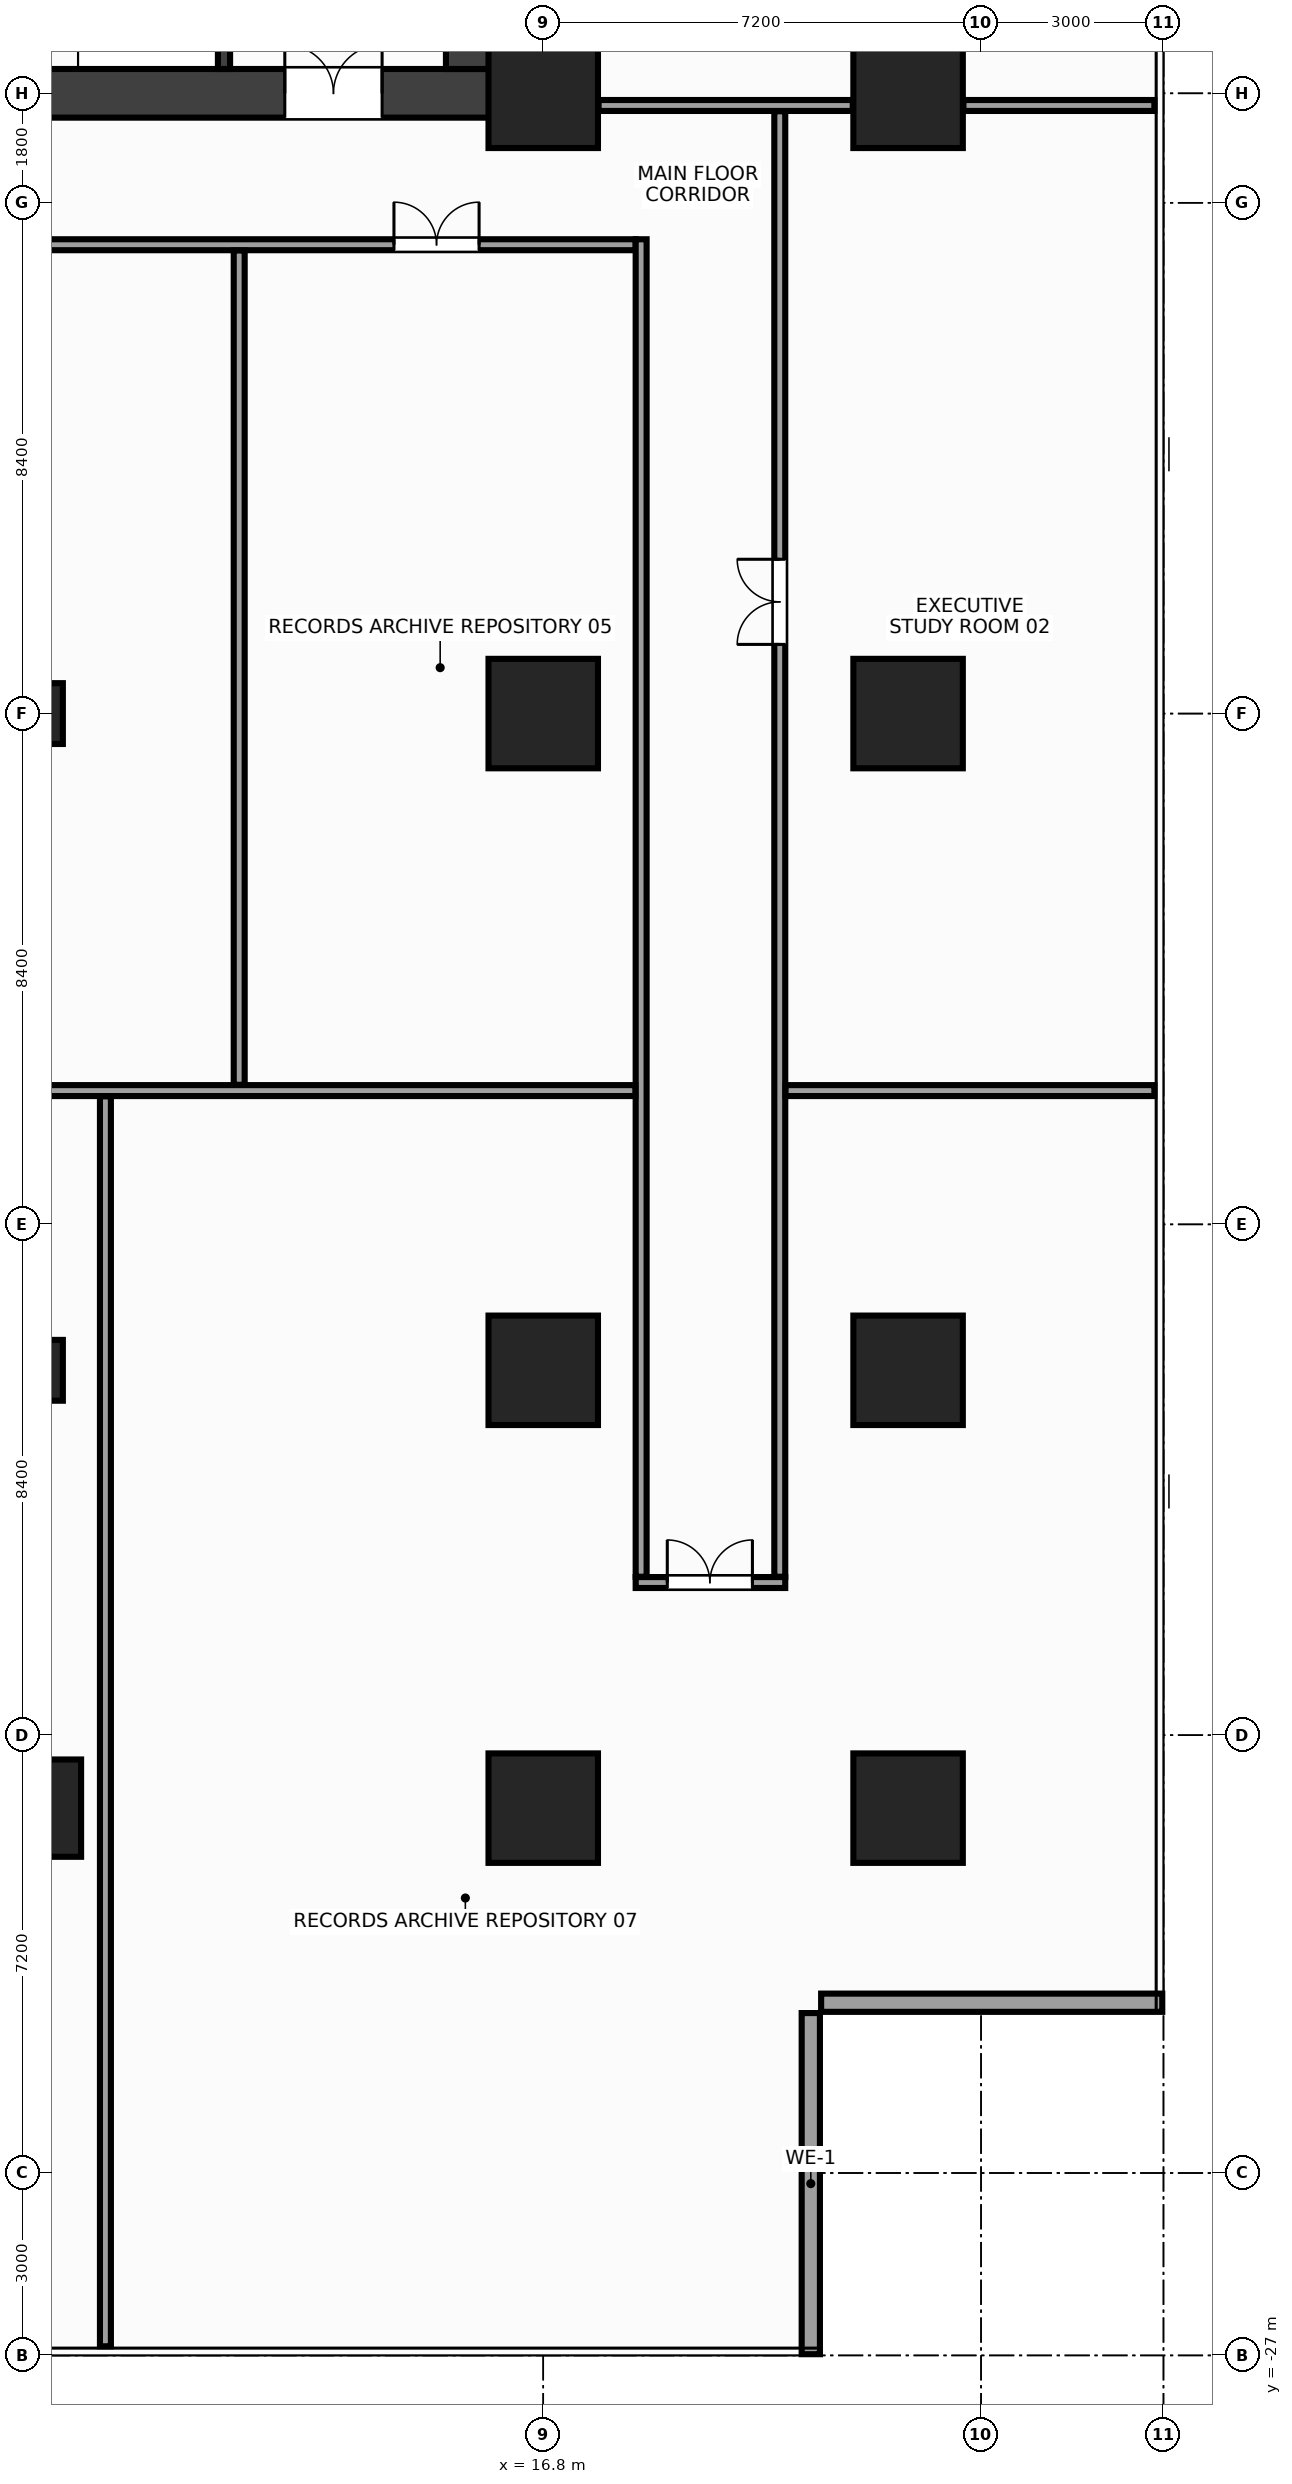
"""IFC4 building model, lengths in metres.
Left out: names, types, materials, properties, quantities, classifications, styles, units other than length and angle.
Written with IfcOpenShell. Run it as: python <this file> out.ifc"""

import sys

from ifc_helpers import new_model, si_unit, direction, frame, frame_2d, origin, origin_2d, place, context, subcontext, project, spatial, rectangle, hollow_rectangle, extrude, source, transform, mapped, element, fill, save


model = new_model("IFC4")
c1 = context("Model", 3, precision=1e-05, world=origin(), true_north=direction((0.0, 1.0)))
c2 = subcontext(c1, "Body", "Model", "MODEL_VIEW")
j1 = project(units=[si_unit("LENGTHUNIT", "METRE"), si_unit("PLANEANGLEUNIT", "RADIAN")], contexts=[c1])
p1 = place(None, origin())
s1 = spatial("IfcSite", under=j1, at=p1, CompositionType="ELEMENT")
p2 = place(p1, origin())
s2 = spatial("IfcBuilding", under=s1, at=p2, CompositionType="ELEMENT")
p3 = place(p2, frame((0.0, 0.0, 66.8)))
s3 = spatial("IfcBuildingStorey", under=s2, at=p3, CompositionType="ELEMENT", Elevation=66.8)
m1 = source(origin(), c2, "Body", "SweptSolid", [
    extrude(rectangle(XDim=32.0, YDim=0.8, at=frame_2d((16.0, 0.0))), origin(), (0.0, 0.0, 1.0), 3.6),
])
p4 = place(p3, frame((-16.0, 10.2, 0.0), z_axis=(0.0, 0.0, 1.0), x_axis=(1.0, 0.0, 0.0)))
e1 = element("IfcWall", 1, at=p4, inside=s3, PredefinedType="SHEAR", context=c2, shape_type="MappedRepresentation", body=[
    mapped(m1, transform((0.0, 0.0, 0.0), x_axis=(1.0, 0.0, 0.0), y_axis=(0.0, 1.0, 0.0), z_axis=(0.0, 0.0, 1.0), scale=1.0)),
])
p5 = place(p4, frame((1.85, 0.0, 0.0)))
e2 = element("IfcOpeningElement", 2, at=p5, cuts=e1, PredefinedType="OPENING", context=c2, shape_type="SweptSolid", body=[
    extrude(rectangle(XDim=1.6, YDim=2.15, at=frame_2d((0.8, 1.075))), frame((0.0, 0.412, 0.0), z_axis=(0.0, -1.0, 0.0), x_axis=(1.0, 0.0, 0.0)), (0.0, 0.0, 1.0), 0.824),
])
p6 = place(p4, frame((28.55, 0.0, 0.0)))
e3 = element("IfcOpeningElement", 3, at=p6, cuts=e1, PredefinedType="OPENING", context=c2, shape_type="SweptSolid", body=[
    extrude(rectangle(XDim=1.6, YDim=2.15, at=frame_2d((0.8, 1.075))), frame((0.0, 0.412, 0.0), z_axis=(0.0, -1.0, 0.0), x_axis=(1.0, 0.0, 0.0)), (0.0, 0.0, 1.0), 0.824),
])
p7 = place(p4, frame((15.25, 0.0, 0.0)))
e4 = element("IfcOpeningElement", 4, at=p7, cuts=e1, PredefinedType="OPENING", context=c2, shape_type="SweptSolid", body=[
    extrude(rectangle(XDim=1.5, YDim=2.2, at=frame_2d((0.75, 1.1))), frame((0.0, 0.412, 0.0), z_axis=(0.0, -1.0, 0.0), x_axis=(1.0, 0.0, 0.0)), (0.0, 0.0, 1.0), 0.824),
])
m2 = source(origin(), c2, "Body", "SweptSolid", [
    extrude(rectangle(XDim=12.8, YDim=0.8, at=frame_2d((6.4, 0.0))), origin(), (0.0, 0.0, 1.0), 3.6),
])
p8 = place(p3, frame((15.6, 10.6, 0.0), z_axis=(0.0, 0.0, 1.0), x_axis=(0.0, 1.0, 0.0)))
e5 = element("IfcWall", 5, at=p8, inside=s3, PredefinedType="SHEAR", context=c2, shape_type="MappedRepresentation", body=[
    mapped(m2, transform((0.0, 0.0, 0.0), x_axis=(1.0, 0.0, 0.0), y_axis=(0.0, 1.0, 0.0), z_axis=(0.0, 0.0, 1.0), scale=1.0)),
])
m3 = source(origin(), c2, "Body", "SweptSolid", [
    extrude(rectangle(XDim=3.05, YDim=0.2, at=frame_2d((1.525, 0.0))), origin(), (0.0, 0.0, 1.0), 3.6),
])
p9 = place(p3, frame((11.55, 10.6, 0.0), z_axis=(0.0, 0.0, 1.0), x_axis=(0.0, 1.0, 0.0)))
e6 = element("IfcWall", 6, at=p9, inside=s3, PredefinedType="SHEAR", context=c2, shape_type="MappedRepresentation", body=[
    mapped(m3, transform((0.0, 0.0, 0.0), x_axis=(1.0, 0.0, 0.0), y_axis=(0.0, 1.0, 0.0), z_axis=(0.0, 0.0, 1.0), scale=1.0)),
])
p10 = place(p9, frame((0.9, 0.0, 0.0)))
e7 = element("IfcOpeningElement", 7, at=p10, cuts=e6, PredefinedType="OPENING", context=c2, shape_type="SweptSolid", body=[
    extrude(rectangle(XDim=1.1, YDim=2.15, at=frame_2d((0.55, 1.075))), frame((0.0, 0.112, 0.0), z_axis=(0.0, -1.0, 0.0), x_axis=(1.0, 0.0, 0.0)), (0.0, 0.0, 1.0), 0.224),
])
m4 = source(origin(), c2, "Body", "SweptSolid", [
    extrude(rectangle(XDim=1.8, YDim=1.8, at=origin_2d()), origin(), (0.0, 0.0, 1.0), 3.6),
])
for number, where, z_axis, x_axis in (
    (8, (16.8, -18.0, 0.0), (0.0, 0.0, 1.0), (1.0, 0.0, 0.0)),
    (9, (16.8, -10.8, 0.0), (0.0, 0.0, 1.0), (1.0, 0.0, 0.0)),
    (10, (16.8, 0.0, 0.0), (0.0, 0.0, 1.0), (1.0, 0.0, 0.0)),
    (11, (16.8, 10.2, 0.0), (0.0, 0.0, 1.0), (1.0, 0.0, 0.0)),
    (12, (22.8, -18.0, 0.0), (0.0, 0.0, 1.0), (1.0, 0.0, 0.0)),
    (13, (22.8, -10.8, 0.0), (0.0, 0.0, 1.0), (1.0, 0.0, 0.0)),
    (14, (22.8, 0.0, 0.0), (0.0, 0.0, 1.0), (1.0, 0.0, 0.0)),
    (15, (22.8, 10.2, 0.0), (0.0, 0.0, 1.0), (1.0, 0.0, 0.0)),
):
    element("IfcColumn", number, at=place(p3, frame(where, z_axis=z_axis, x_axis=x_axis)), inside=s3, PredefinedType="COLUMN", context=c2, shape_type="MappedRepresentation", body=[
        mapped(m4, transform((0.0, 0.0, 0.0), x_axis=(1.0, 0.0, 0.0), y_axis=(0.0, 1.0, 0.0), z_axis=(0.0, 0.0, 1.0), scale=1.0)),
    ])
m5 = source(origin(), c2, "Body", "SweptSolid", [
    extrude(rectangle(XDim=1.6, YDim=1.6, at=origin_2d()), origin(), (0.0, 0.0, 1.0), 3.6),
])
p11 = place(p3, frame((8.4, -18.0, 0.0), z_axis=(0.0, 0.0, 1.0), x_axis=(1.0, 0.0, 0.0)))
e16 = element("IfcColumn", 16, at=p11, inside=s3, PredefinedType="COLUMN", context=c2, shape_type="MappedRepresentation", body=[
    mapped(m5, transform((0.0, 0.0, 0.0), x_axis=(1.0, 0.0, 0.0), y_axis=(0.0, 1.0, 0.0), z_axis=(0.0, 0.0, 1.0), scale=1.0)),
])
m6 = source(origin(), c2, "Body", "SweptSolid", [
    extrude(hollow_rectangle(XDim=1.0, YDim=1.0, WallThickness=0.045, at=origin_2d()), origin(), (0.0, 0.0, 1.0), 3.6),
])
for number, where, z_axis, x_axis in (
    (17, (8.4, 0.0, 0.0), (0.0, 0.0, 1.0), (1.0, 0.0, 0.0)),
    (18, (8.4, -10.8, 0.0), (0.0, 0.0, 1.0), (1.0, 0.0, 0.0)),
):
    element("IfcColumn", number, at=place(p3, frame(where, z_axis=z_axis, x_axis=x_axis)), inside=s3, PredefinedType="COLUMN", context=c2, shape_type="MappedRepresentation", body=[
        mapped(m6, transform((0.0, 0.0, 0.0), x_axis=(1.0, 0.0, 0.0), y_axis=(0.0, 1.0, 0.0), z_axis=(0.0, 0.0, 1.0), scale=1.0)),
    ])
m7 = source(origin(), c2, "Body", "SweptSolid", [
    extrude(rectangle(XDim=5.61, YDim=0.3, at=frame_2d((2.805, 0.0))), origin(), (0.0, 0.0, 1.0), 2.68),
])
for number, where, z_axis, x_axis in (
    (19, (21.2, -26.98, 0.0), (0.0, 0.0, 1.0), (0.0, 1.0, 0.0)),
    (20, (21.37, -21.2, 0.0), (0.0, 0.0, 1.0), (1.0, 0.0, 0.0)),
):
    element("IfcWall", number, at=place(p3, frame(where, z_axis=z_axis, x_axis=x_axis)), inside=s3, PredefinedType="STANDARD", context=c2, shape_type="MappedRepresentation", body=[
        mapped(m7, transform((0.0, 0.0, 0.0), x_axis=(1.0, 0.0, 0.0), y_axis=(0.0, 1.0, 0.0), z_axis=(0.0, 0.0, 1.0), scale=1.0)),
    ])
m8 = source(origin(), c2, "Body", "SweptSolid", [
    extrude(rectangle(XDim=4.18, YDim=0.18, at=frame_2d((2.09, 0.0))), origin(), (0.0, 0.0, 1.0), 2.685),
])
p12 = place(p3, frame((17.71, 10.0, 0.0), z_axis=(0.0, 0.0, 1.0), x_axis=(1.0, 0.0, 0.0)))
e21 = element("IfcWall", 21, at=p12, inside=s3, PredefinedType="PARTITIONING", context=c2, shape_type="MappedRepresentation", body=[
    mapped(m8, transform((0.0, 0.0, 0.0), x_axis=(1.0, 0.0, 0.0), y_axis=(0.0, 1.0, 0.0), z_axis=(0.0, 0.0, 1.0), scale=1.0)),
])
m9 = source(origin(), c2, "Body", "SweptSolid", [
    extrude(rectangle(XDim=3.14, YDim=0.18, at=frame_2d((1.57, 0.0))), origin(), (0.0, 0.0, 1.0), 2.375),
])
p13 = place(p3, frame((23.71, 10.0, 0.0), z_axis=(0.0, 0.0, 1.0), x_axis=(1.0, 0.0, 0.0)))
e22 = element("IfcWall", 22, at=p13, inside=s3, PredefinedType="PARTITIONING", context=c2, shape_type="MappedRepresentation", body=[
    mapped(m9, transform((0.0, 0.0, 0.0), x_axis=(1.0, 0.0, 0.0), y_axis=(0.0, 1.0, 0.0), z_axis=(0.0, 0.0, 1.0), scale=1.0)),
])
m10 = source(origin(), c2, "Body", "SweptSolid", [
    extrude(rectangle(XDim=36.64, YDim=0.18, at=frame_2d((18.32, 0.0))), origin(), (0.0, 0.0, 1.0), 2.685),
])
p14 = place(p3, frame((-18.32, 7.71, 0.0), z_axis=(0.0, 0.0, 1.0), x_axis=(1.0, 0.0, 0.0)))
e23 = element("IfcWall", 23, at=p14, inside=s3, PredefinedType="PARTITIONING", context=c2, shape_type="MappedRepresentation", body=[
    mapped(m10, transform((0.0, 0.0, 0.0), x_axis=(1.0, 0.0, 0.0), y_axis=(0.0, 1.0, 0.0), z_axis=(0.0, 0.0, 1.0), scale=1.0)),
])
p15 = place(p14, frame((3.675, 0.0, 0.0)))
e24 = element("IfcOpeningElement", 24, at=p15, cuts=e23, PredefinedType="OPENING", context=c2, shape_type="SweptSolid", body=[
    extrude(rectangle(XDim=1.4, YDim=2.2, at=frame_2d((0.7, 1.1))), frame((0.0, 0.102, 0.0), z_axis=(0.0, -1.0, 0.0), x_axis=(1.0, 0.0, 0.0)), (0.0, 0.0, 1.0), 0.204),
])
p16 = place(p14, frame((17.62, 0.0, 0.0)))
e25 = element("IfcOpeningElement", 25, at=p16, cuts=e23, PredefinedType="OPENING", context=c2, shape_type="SweptSolid", body=[
    extrude(rectangle(XDim=1.4, YDim=2.2, at=frame_2d((0.7, 1.1))), frame((0.0, 0.102, 0.0), z_axis=(0.0, -1.0, 0.0), x_axis=(1.0, 0.0, 0.0)), (0.0, 0.0, 1.0), 0.204),
])
p17 = place(p14, frame((32.665, 0.0, 0.0)))
e26 = element("IfcOpeningElement", 26, at=p17, cuts=e23, PredefinedType="OPENING", context=c2, shape_type="SweptSolid", body=[
    extrude(rectangle(XDim=1.4, YDim=2.2, at=frame_2d((0.7, 1.1))), frame((0.0, 0.102, 0.0), z_axis=(0.0, -1.0, 0.0), x_axis=(1.0, 0.0, 0.0)), (0.0, 0.0, 1.0), 0.204),
])
m11 = source(origin(), c2, "Body", "SweptSolid", [
    extrude(rectangle(XDim=2.46, YDim=0.18, at=frame_2d((1.23, 0.0))), origin(), (0.0, 0.0, 1.0), 2.835),
])
p18 = place(p3, frame((18.32, -14.29, 0.0), z_axis=(0.0, 0.0, 1.0), x_axis=(1.0, 0.0, 0.0)))
e27 = element("IfcWall", 27, at=p18, inside=s3, PredefinedType="PARTITIONING", context=c2, shape_type="MappedRepresentation", body=[
    mapped(m11, transform((0.0, 0.0, 0.0), x_axis=(1.0, 0.0, 0.0), y_axis=(0.0, 1.0, 0.0), z_axis=(0.0, 0.0, 1.0), scale=1.0)),
])
p19 = place(p18, frame((0.52, 0.0, 0.0)))
e28 = element("IfcOpeningElement", 28, at=p19, cuts=e27, PredefinedType="OPENING", context=c2, shape_type="SweptSolid", body=[
    extrude(rectangle(XDim=1.4, YDim=2.2, at=frame_2d((0.7, 1.1))), frame((0.0, 0.102, 0.0), z_axis=(0.0, -1.0, 0.0), x_axis=(1.0, 0.0, 0.0)), (0.0, 0.0, 1.0), 0.204),
])
m12 = source(origin(), c2, "Body", "SweptSolid", [
    extrude(rectangle(XDim=21.995, YDim=0.18, at=frame_2d((10.998, 0.0))), origin(), (0.0, 0.0, 1.0), 2.685),
])
p20 = place(p3, frame((18.41, -14.195, 0.0), z_axis=(0.0, 0.0, 1.0), x_axis=(0.0, 1.0, 0.0)))
e29 = element("IfcWall", 29, at=p20, inside=s3, PredefinedType="PARTITIONING", context=c2, shape_type="MappedRepresentation", body=[
    mapped(m12, transform((0.0, 0.0, 0.0), x_axis=(1.0, 0.0, 0.0), y_axis=(0.0, 1.0, 0.0), z_axis=(0.0, 0.0, 1.0), scale=1.0)),
])
m13 = source(origin(), c2, "Body", "SweptSolid", [
    extrude(rectangle(XDim=24.1, YDim=0.18, at=frame_2d((12.05, 0.0))), origin(), (0.0, 0.0, 1.0), 2.685),
])
p21 = place(p3, frame((20.69, -14.195, 0.0), z_axis=(0.0, 0.0, 1.0), x_axis=(0.0, 1.0, 0.0)))
e30 = element("IfcWall", 30, at=p21, inside=s3, PredefinedType="PARTITIONING", context=c2, shape_type="MappedRepresentation", body=[
    mapped(m13, transform((0.0, 0.0, 0.0), x_axis=(1.0, 0.0, 0.0), y_axis=(0.0, 1.0, 0.0), z_axis=(0.0, 0.0, 1.0), scale=1.0)),
])
p22 = place(p21, frame((15.333, 0.0, 0.0)))
e31 = element("IfcOpeningElement", 31, at=p22, cuts=e30, PredefinedType="OPENING", context=c2, shape_type="SweptSolid", body=[
    extrude(rectangle(XDim=1.4, YDim=2.2, at=frame_2d((0.7, 1.1))), frame((0.0, 0.102, 0.0), z_axis=(0.0, -1.0, 0.0), x_axis=(1.0, 0.0, 0.0)), (0.0, 0.0, 1.0), 0.204),
])
m14 = source(origin(), c2, "Body", "SweptSolid", [
    extrude(rectangle(XDim=36.63, YDim=0.18, at=frame_2d((18.315, 0.0))), origin(), (0.0, 0.0, 1.0), 2.685),
])
p23 = place(p3, frame((-18.315, -6.2, 0.0), z_axis=(0.0, 0.0, 1.0), x_axis=(1.0, 0.0, 0.0)))
e32 = element("IfcWall", 32, at=p23, inside=s3, PredefinedType="PARTITIONING", context=c2, shape_type="MappedRepresentation", body=[
    mapped(m14, transform((0.0, 0.0, 0.0), x_axis=(1.0, 0.0, 0.0), y_axis=(0.0, 1.0, 0.0), z_axis=(0.0, 0.0, 1.0), scale=1.0)),
])
p24 = place(p23, frame((4.115, 0.0, 0.0)))
e33 = element("IfcOpeningElement", 33, at=p24, cuts=e32, PredefinedType="OPENING", context=c2, shape_type="SweptSolid", body=[
    extrude(rectangle(XDim=1.4, YDim=2.2, at=frame_2d((0.7, 1.1))), frame((0.0, 0.102, 0.0), z_axis=(0.0, -1.0, 0.0), x_axis=(1.0, 0.0, 0.0)), (0.0, 0.0, 1.0), 0.204),
])
p25 = place(p23, frame((21.215, 0.0, 0.0)))
e34 = element("IfcOpeningElement", 34, at=p25, cuts=e32, PredefinedType="OPENING", context=c2, shape_type="SweptSolid", body=[
    extrude(rectangle(XDim=1.4, YDim=2.2, at=frame_2d((0.7, 1.1))), frame((0.0, 0.102, 0.0), z_axis=(0.0, -1.0, 0.0), x_axis=(1.0, 0.0, 0.0)), (0.0, 0.0, 1.0), 0.204),
])
m15 = source(origin(), c2, "Body", "SweptSolid", [
    extrude(rectangle(XDim=6.065, YDim=0.18, at=frame_2d((3.033, 0.0))), origin(), (0.0, 0.0, 1.0), 2.685),
])
p26 = place(p3, frame((20.785, -6.2, 0.0), z_axis=(0.0, 0.0, 1.0), x_axis=(1.0, 0.0, 0.0)))
e35 = element("IfcWall", 35, at=p26, inside=s3, PredefinedType="PARTITIONING", context=c2, shape_type="MappedRepresentation", body=[
    mapped(m15, transform((0.0, 0.0, 0.0), x_axis=(1.0, 0.0, 0.0), y_axis=(0.0, 1.0, 0.0), z_axis=(0.0, 0.0, 1.0), scale=1.0)),
])
m16 = source(origin(), c2, "Body", "SweptSolid", [
    extrude(rectangle(XDim=13.72, YDim=0.18, at=frame_2d((6.86, 0.0))), origin(), (0.0, 0.0, 1.0), 2.585),
])
p27 = place(p3, frame((11.8, -6.105, 0.0), z_axis=(0.0, 0.0, 1.0), x_axis=(0.0, 1.0, 0.0)))
e36 = element("IfcWall", 36, at=p27, inside=s3, PredefinedType="PARTITIONING", context=c2, shape_type="MappedRepresentation", body=[
    mapped(m16, transform((0.0, 0.0, 0.0), x_axis=(1.0, 0.0, 0.0), y_axis=(0.0, 1.0, 0.0), z_axis=(0.0, 0.0, 1.0), scale=1.0)),
])
m17 = source(origin(), c2, "Body", "SweptSolid", [
    extrude(rectangle(XDim=20.555, YDim=0.18, at=frame_2d((10.278, 0.0))), origin(), (0.0, 0.0, 1.0), 2.685),
])
p28 = place(p3, frame((9.6, -26.85, 0.0), z_axis=(0.0, 0.0, 1.0), x_axis=(0.0, 1.0, 0.0)))
e37 = element("IfcWall", 37, at=p28, inside=s3, PredefinedType="PARTITIONING", context=c2, shape_type="MappedRepresentation", body=[
    mapped(m17, transform((0.0, 0.0, 0.0), x_axis=(1.0, 0.0, 0.0), y_axis=(0.0, 1.0, 0.0), z_axis=(0.0, 0.0, 1.0), scale=1.0)),
])
m18 = source(origin(), c2, "Body", "SweptSolid", [
    extrude(rectangle(XDim=1.6, YDim=2.15, at=frame_2d((0.8, 1.075))), frame((0.0, 0.025, 0.0), z_axis=(0.0, -1.0, 0.0), x_axis=(1.0, 0.0, 0.0)), (0.0, 0.0, 1.0), 0.05),
])
p29 = place(p6, origin())
e38 = element("IfcDoor", 38, at=p29, inside=s3, OperationType="DOUBLE_DOOR_SINGLE_SWING", PredefinedType="DOOR", context=c2, shape_type="MappedRepresentation", body=[
    mapped(m18, transform((0.0, 0.0, 0.0), x_axis=(1.0, 0.0, 0.0), y_axis=(0.0, 1.0, 0.0), z_axis=(0.0, 0.0, 1.0), scale=1.0)),
])
fill(e3, e38)
m19 = source(origin(), c2, "Body", "SweptSolid", [
    extrude(rectangle(XDim=1.4, YDim=2.2, at=frame_2d((0.7, 1.1))), frame((0.0, 0.025, 0.0), z_axis=(0.0, -1.0, 0.0), x_axis=(1.0, 0.0, 0.0)), (0.0, 0.0, 1.0), 0.05),
])
p30 = place(p22, origin())
e39 = element("IfcDoor", 39, at=p30, inside=s3, OperationType="DOUBLE_DOOR_SINGLE_SWING", PredefinedType="DOOR", context=c2, shape_type="MappedRepresentation", body=[
    mapped(m19, transform((0.0, 0.0, 0.0), x_axis=(1.0, 0.0, 0.0), y_axis=(0.0, 1.0, 0.0), z_axis=(0.0, 0.0, 1.0), scale=1.0)),
])
fill(e31, e39)
p31 = place(p17, origin())
e40 = element("IfcDoor", 40, at=p31, inside=s3, OperationType="DOUBLE_DOOR_SINGLE_SWING", PredefinedType="DOOR", context=c2, shape_type="MappedRepresentation", body=[
    mapped(m19, transform((0.0, 0.0, 0.0), x_axis=(1.0, 0.0, 0.0), y_axis=(0.0, 1.0, 0.0), z_axis=(0.0, 0.0, 1.0), scale=1.0)),
])
fill(e26, e40)
p32 = place(p19, origin())
e41 = element("IfcDoor", 41, at=p32, inside=s3, OperationType="DOUBLE_DOOR_SINGLE_SWING", PredefinedType="DOOR", context=c2, shape_type="MappedRepresentation", body=[
    mapped(m19, transform((0.0, 0.0, 0.0), x_axis=(1.0, 0.0, 0.0), y_axis=(0.0, 1.0, 0.0), z_axis=(0.0, 0.0, 1.0), scale=1.0)),
])
fill(e28, e41)
save(model, sys.argv[1])
